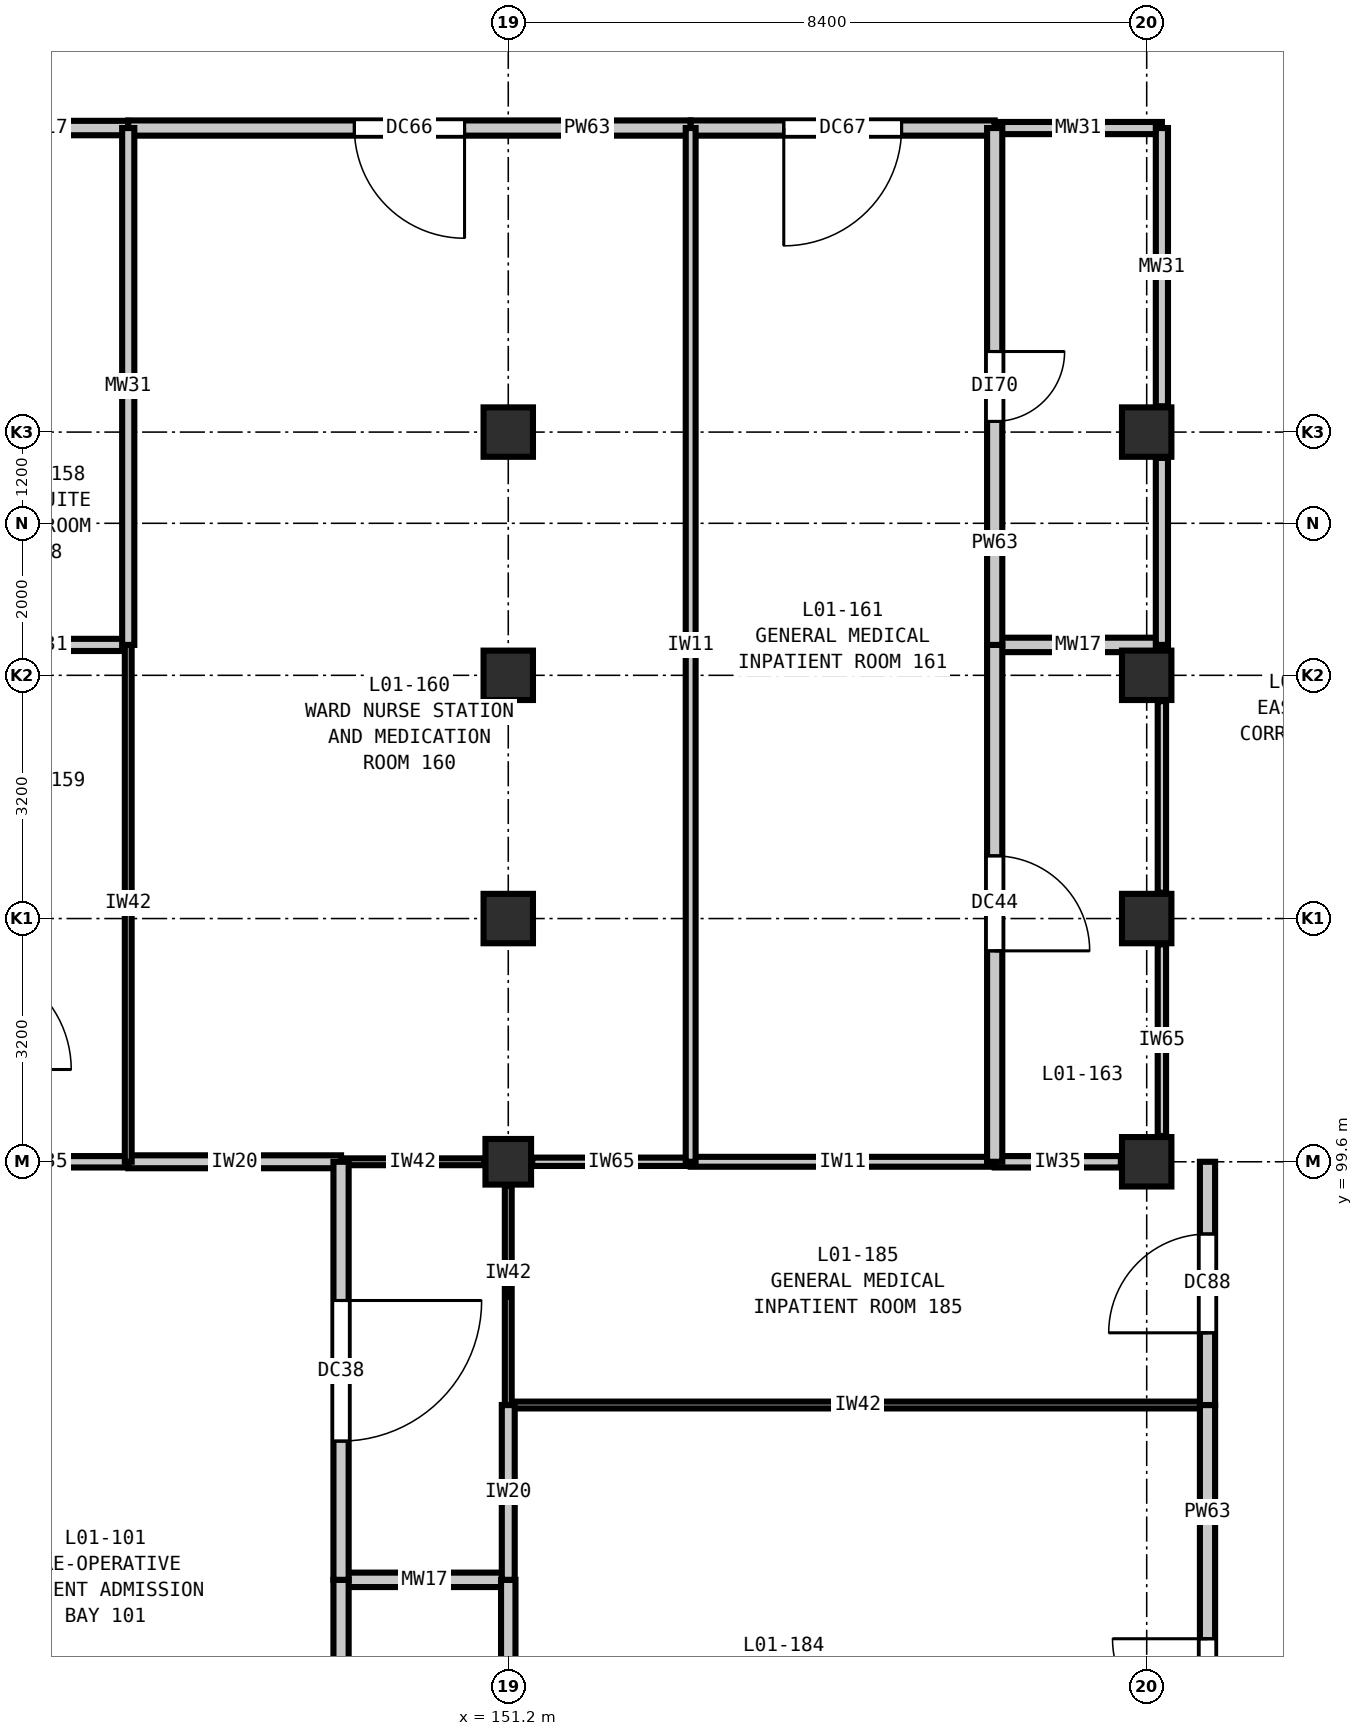
"""IFC4 building model, lengths in metres.
Left out: names, types, materials, properties, quantities, classifications, styles, units other than length and angle.
Written with IfcOpenShell. Run it as: python <this file> out.ifc"""

import sys

from ifc_helpers import new_model, si_unit, direction, frame, frame_2d, origin, origin_2d, place, context, subcontext, project, spatial, rectangle, extrude, element, fill, save


model = new_model("IFC4")
c1 = context("Model", 3, precision=1e-05, world=origin(), true_north=direction((0.0, 1.0)))
c2 = subcontext(c1, "Body", "Model", "MODEL_VIEW")
j1 = project(units=[si_unit("LENGTHUNIT", "METRE"), si_unit("PLANEANGLEUNIT", "RADIAN")], contexts=[c1])
p1 = place(None, origin())
s1 = spatial("IfcSite", under=j1, at=p1, CompositionType="ELEMENT")
p2 = place(p1, origin())
s2 = spatial("IfcBuilding", under=s1, at=p2, CompositionType="ELEMENT")
p3 = place(p2, frame((0.0, 0.0, 5.4)))
s3 = spatial("IfcBuildingStorey", under=s2, at=p3, CompositionType="ELEMENT", Elevation=5.4)
p4 = place(p3, frame((151.2, 99.6, 0.0), z_axis=(0.0, 0.0, 1.0), x_axis=(1.0, 0.0, 0.0)))
e1 = element("IfcColumn", 1, at=p4, inside=s3, PredefinedType="COLUMN", context=c2, shape_type="SweptSolid", body=[
    extrude(rectangle(XDim=0.6, YDim=0.6, at=origin_2d()), origin(), (0.0, 0.0, 1.0), 5.4),
])
for number, where, z_axis, x_axis in (
    (2, (151.2, 102.8, 0.0), (0.0, 0.0, 1.0), (1.0, 0.0, 0.0)),
    (3, (151.2, 106.0, 0.0), (0.0, 0.0, 1.0), (1.0, 0.0, 0.0)),
    (4, (151.2, 109.2, 0.0), (0.0, 0.0, 1.0), (1.0, 0.0, 0.0)),
    (5, (159.6, 99.6, 0.0), (0.0, 0.0, 1.0), (1.0, 0.0, 0.0)),
    (6, (159.6, 102.8, 0.0), (0.0, 0.0, 1.0), (1.0, 0.0, 0.0)),
    (7, (159.6, 106.0, 0.0), (0.0, 0.0, 1.0), (1.0, 0.0, 0.0)),
    (8, (159.6, 109.2, 0.0), (0.0, 0.0, 1.0), (1.0, 0.0, 0.0)),
):
    element("IfcColumn", number, at=place(p3, frame(where, z_axis=z_axis, x_axis=x_axis)), inside=s3, PredefinedType="COLUMN", context=c2, shape_type="SweptSolid", body=[
        extrude(rectangle(XDim=0.65, YDim=0.65, at=origin_2d()), origin(), (0.0, 0.0, 1.0), 5.4),
    ])
p5 = place(p3, frame((149.0, 94.1, 0.0), z_axis=(0.0, 0.0, 1.0), x_axis=(1.0, 0.0, 0.0)))
e9 = element("IfcWall", 9, at=p5, inside=s3, PredefinedType="PLUMBINGWALL", context=c2, shape_type="SweptSolid", body=[
    extrude(rectangle(XDim=2.2, YDim=0.19, at=frame_2d((1.1, 0.0))), origin(), (0.0, 0.0, 1.0), 5.05),
])
p6 = place(p3, frame((151.2, 96.4, 0.0), z_axis=(0.0, 0.0, 1.0), x_axis=(1.0, 0.0, 0.0)))
e10 = element("IfcWall", 10, at=p6, inside=s3, PredefinedType="PARTITIONING", context=c2, shape_type="SweptSolid", body=[
    extrude(rectangle(XDim=9.2, YDim=0.09, at=frame_2d((4.6, 0.0))), origin(), (0.0, 0.0, 1.0), 5.05),
])
p7 = place(p3, frame((144.0, 99.6, 0.0), z_axis=(0.0, 0.0, 1.0), x_axis=(1.0, 0.0, 0.0)))
e11 = element("IfcWall", 11, at=p7, inside=s3, PredefinedType="PARTITIONING", context=c2, shape_type="SweptSolid", body=[
    extrude(rectangle(XDim=2.2, YDim=0.15, at=frame_2d((1.1, 0.0))), origin(), (0.0, 0.0, 1.0), 4.685),
])
p8 = place(p3, frame((146.2, 99.6, 0.0), z_axis=(0.0, 0.0, 1.0), x_axis=(1.0, 0.0, 0.0)))
e12 = element("IfcWall", 12, at=p8, inside=s3, PredefinedType="PARTITIONING", context=c2, shape_type="SweptSolid", body=[
    extrude(rectangle(XDim=2.8, YDim=0.17, at=frame_2d((1.4, 0.0))), origin(), (0.0, 0.0, 1.0), 4.685),
])
p9 = place(p3, frame((149.0, 99.6, 0.0), z_axis=(0.0, 0.0, 1.0), x_axis=(1.0, 0.0, 0.0)))
e13 = element("IfcWall", 13, at=p9, inside=s3, PredefinedType="PARTITIONING", context=c2, shape_type="SweptSolid", body=[
    extrude(rectangle(XDim=1.885, YDim=0.09, at=frame_2d((0.942, 0.0))), origin(), (0.0, 0.0, 1.0), 4.685),
])
p10 = place(p3, frame((151.515, 99.6, 0.0), z_axis=(0.0, 0.0, 1.0), x_axis=(1.0, 0.0, 0.0)))
e14 = element("IfcWall", 14, at=p10, inside=s3, PredefinedType="PARTITIONING", context=c2, shape_type="SweptSolid", body=[
    extrude(rectangle(XDim=2.085, YDim=0.11, at=frame_2d((1.042, 0.0))), origin(), (0.0, 0.0, 1.0), 4.685),
])
p11 = place(p3, frame((153.6, 99.6, 0.0), z_axis=(0.0, 0.0, 1.0), x_axis=(1.0, 0.0, 0.0)))
e15 = element("IfcWall", 15, at=p11, inside=s3, PredefinedType="PARTITIONING", context=c2, shape_type="SweptSolid", body=[
    extrude(rectangle(XDim=4.0, YDim=0.13, at=frame_2d((2.0, 0.0))), origin(), (0.0, 0.0, 1.0), 4.685),
])
p12 = place(p3, frame((157.6, 99.6, 0.0), z_axis=(0.0, 0.0, 1.0), x_axis=(1.0, 0.0, 0.0)))
e16 = element("IfcWall", 16, at=p12, inside=s3, PredefinedType="PARTITIONING", context=c2, shape_type="SweptSolid", body=[
    extrude(rectangle(XDim=1.66, YDim=0.15, at=frame_2d((0.83, 0.0))), origin(), (0.0, 0.0, 1.0), 4.685),
])
p13 = place(p3, frame((144.0, 106.4, 0.0), z_axis=(0.0, 0.0, 1.0), x_axis=(1.0, 0.0, 0.0)))
e17 = element("IfcWall", 17, at=p13, inside=s3, PredefinedType="PLUMBINGWALL", context=c2, shape_type="SweptSolid", body=[
    extrude(rectangle(XDim=2.2, YDim=0.16, at=frame_2d((1.1, 0.0))), origin(), (0.0, 0.0, 1.0), 5.05),
])
for number, where, z_axis, x_axis in (
    (18, (157.6, 106.4, 0.0), (0.0, 0.0, 1.0), (1.0, 0.0, 0.0)),
    (19, (144.0, 113.2, 0.0), (0.0, 0.0, 1.0), (1.0, 0.0, 0.0)),
):
    element("IfcWall", number, at=place(p3, frame(where, z_axis=z_axis, x_axis=x_axis)), inside=s3, PredefinedType="PLUMBINGWALL", context=c2, shape_type="SweptSolid", body=[
        extrude(rectangle(XDim=2.2, YDim=0.19, at=frame_2d((1.1, 0.0))), origin(), (0.0, 0.0, 1.0), 5.05),
    ])
p14 = place(p3, frame((146.2, 113.2, 0.0), z_axis=(0.0, 0.0, 1.0), x_axis=(1.0, 0.0, 0.0)))
e20 = element("IfcWall", 20, at=p14, inside=s3, PredefinedType="PARTITIONING", context=c2, shape_type="SweptSolid", body=[
    extrude(rectangle(XDim=7.4, YDim=0.2, at=frame_2d((3.7, 0.0))), origin(), (0.0, 0.0, 1.0), 5.05),
])
p15 = place(p14, frame((2.975, 0.0, 0.0)))
e21 = element("IfcOpeningElement", 21, at=p15, cuts=e20, PredefinedType="OPENING", context=c2, shape_type="SweptSolid", body=[
    extrude(rectangle(XDim=1.45, YDim=2.25, at=frame_2d((0.725, 1.125))), frame((0.0, 0.11, 0.0), z_axis=(0.0, -1.0, 0.0), x_axis=(1.0, 0.0, 0.0)), (0.0, 0.0, 1.0), 0.22),
])
p16 = place(p3, frame((153.6, 113.2, 0.0), z_axis=(0.0, 0.0, 1.0), x_axis=(1.0, 0.0, 0.0)))
e22 = element("IfcWall", 22, at=p16, inside=s3, PredefinedType="PARTITIONING", context=c2, shape_type="SweptSolid", body=[
    extrude(rectangle(XDim=4.0, YDim=0.2, at=frame_2d((2.0, 0.0))), origin(), (0.0, 0.0, 1.0), 5.05),
])
p17 = place(p16, frame((1.225, 0.0, 0.0)))
e23 = element("IfcOpeningElement", 23, at=p17, cuts=e22, PredefinedType="OPENING", context=c2, shape_type="SweptSolid", body=[
    extrude(rectangle(XDim=1.55, YDim=2.25, at=frame_2d((0.775, 1.125))), frame((0.0, 0.11, 0.0), z_axis=(0.0, -1.0, 0.0), x_axis=(1.0, 0.0, 0.0)), (0.0, 0.0, 1.0), 0.22),
])
p18 = place(p3, frame((157.6, 113.2, 0.0), z_axis=(0.0, 0.0, 1.0), x_axis=(1.0, 0.0, 0.0)))
e24 = element("IfcWall", 24, at=p18, inside=s3, PredefinedType="PLUMBINGWALL", context=c2, shape_type="SweptSolid", body=[
    extrude(rectangle(XDim=2.2, YDim=0.16, at=frame_2d((1.1, 0.0))), origin(), (0.0, 0.0, 1.0), 5.05),
])
p19 = place(p3, frame((146.2, 99.6, 0.0), z_axis=(0.0, 0.0, 1.0), x_axis=(0.0, 1.0, 0.0)))
e25 = element("IfcWall", 25, at=p19, inside=s3, PredefinedType="PARTITIONING", context=c2, shape_type="SweptSolid", body=[
    extrude(rectangle(XDim=6.8, YDim=0.09, at=frame_2d((3.4, 0.0))), origin(), (0.0, 0.0, 1.0), 5.05),
])
p20 = place(p3, frame((146.2, 106.4, 0.0), z_axis=(0.0, 0.0, 1.0), x_axis=(0.0, 1.0, 0.0)))
e26 = element("IfcWall", 26, at=p20, inside=s3, PredefinedType="PLUMBINGWALL", context=c2, shape_type="SweptSolid", body=[
    extrude(rectangle(XDim=6.8, YDim=0.16, at=frame_2d((3.4, 0.0))), origin(), (0.0, 0.0, 1.0), 5.05),
])
p21 = place(p3, frame((149.0, 88.6, 0.0), z_axis=(0.0, 0.0, 1.0), x_axis=(0.0, 1.0, 0.0)))
e27 = element("IfcWall", 27, at=p21, inside=s3, PredefinedType="PARTITIONING", context=c2, shape_type="SweptSolid", body=[
    extrude(rectangle(XDim=5.5, YDim=0.2, at=frame_2d((2.75, 0.0))), origin(), (0.0, 0.0, 1.0), 5.05),
])
p22 = place(p21, frame((2.29, 0.0, 0.0)))
e28 = element("IfcOpeningElement", 28, at=p22, cuts=e27, PredefinedType="OPENING", context=c2, shape_type="SweptSolid", body=[
    extrude(rectangle(XDim=0.92, YDim=2.1, at=frame_2d((0.46, 1.05))), frame((0.0, 0.11, 0.0), z_axis=(0.0, -1.0, 0.0), x_axis=(1.0, 0.0, 0.0)), (0.0, 0.0, 1.0), 0.22),
])
p23 = place(p3, frame((149.0, 94.1, 0.0), z_axis=(0.0, 0.0, 1.0), x_axis=(0.0, 1.0, 0.0)))
e29 = element("IfcWall", 29, at=p23, inside=s3, PredefinedType="PARTITIONING", context=c2, shape_type="SweptSolid", body=[
    extrude(rectangle(XDim=5.5, YDim=0.2, at=frame_2d((2.75, 0.0))), origin(), (0.0, 0.0, 1.0), 5.05),
])
p24 = place(p23, frame((1.825, 0.0, 0.0)))
e30 = element("IfcOpeningElement", 30, at=p24, cuts=e29, PredefinedType="OPENING", context=c2, shape_type="SweptSolid", body=[
    extrude(rectangle(XDim=1.85, YDim=2.3, at=frame_2d((0.925, 1.15))), frame((0.0, 0.11, 0.0), z_axis=(0.0, -1.0, 0.0), x_axis=(1.0, 0.0, 0.0)), (0.0, 0.0, 1.0), 0.22),
])
p25 = place(p3, frame((151.2, 91.515, 0.0), z_axis=(0.0, 0.0, 1.0), x_axis=(0.0, 1.0, 0.0)))
e31 = element("IfcWall", 31, at=p25, inside=s3, PredefinedType="PLUMBINGWALL", context=c2, shape_type="SweptSolid", body=[
    extrude(rectangle(XDim=2.585, YDim=0.19, at=frame_2d((1.292, 0.0))), origin(), (0.0, 0.0, 1.0), 4.735),
])
p26 = place(p3, frame((151.2, 94.1, 0.0), z_axis=(0.0, 0.0, 1.0), x_axis=(0.0, 1.0, 0.0)))
e32 = element("IfcWall", 32, at=p26, inside=s3, PredefinedType="PARTITIONING", context=c2, shape_type="SweptSolid", body=[
    extrude(rectangle(XDim=2.3, YDim=0.17, at=frame_2d((1.15, 0.0))), origin(), (0.0, 0.0, 1.0), 4.735),
])
p27 = place(p3, frame((151.2, 96.4, 0.0), z_axis=(0.0, 0.0, 1.0), x_axis=(0.0, 1.0, 0.0)))
e33 = element("IfcWall", 33, at=p27, inside=s3, PredefinedType="PARTITIONING", context=c2, shape_type="SweptSolid", body=[
    extrude(rectangle(XDim=2.885, YDim=0.09, at=frame_2d((1.442, 0.0))), origin(), (0.0, 0.0, 1.0), 4.735),
])
p28 = place(p3, frame((153.6, 99.6, 0.0), z_axis=(0.0, 0.0, 1.0), x_axis=(0.0, 1.0, 0.0)))
e34 = element("IfcWall", 34, at=p28, inside=s3, PredefinedType="PARTITIONING", context=c2, shape_type="SweptSolid", body=[
    extrude(rectangle(XDim=13.6, YDim=0.13, at=frame_2d((6.8, 0.0))), origin(), (0.0, 0.0, 1.0), 5.05),
])
p29 = place(p3, frame((157.6, 99.6, 0.0), z_axis=(0.0, 0.0, 1.0), x_axis=(0.0, 1.0, 0.0)))
e35 = element("IfcWall", 35, at=p29, inside=s3, PredefinedType="PARTITIONING", context=c2, shape_type="SweptSolid", body=[
    extrude(rectangle(XDim=6.8, YDim=0.2, at=frame_2d((3.4, 0.0))), origin(), (0.0, 0.0, 1.0), 5.05),
])
p30 = place(p29, frame((2.775, 0.0, 0.0)))
e36 = element("IfcOpeningElement", 36, at=p30, cuts=e35, PredefinedType="OPENING", context=c2, shape_type="SweptSolid", body=[
    extrude(rectangle(XDim=1.25, YDim=2.15, at=frame_2d((0.625, 1.075))), frame((0.0, 0.11, 0.0), z_axis=(0.0, -1.0, 0.0), x_axis=(1.0, 0.0, 0.0)), (0.0, 0.0, 1.0), 0.22),
])
p31 = place(p3, frame((157.6, 106.4, 0.0), z_axis=(0.0, 0.0, 1.0), x_axis=(0.0, 1.0, 0.0)))
e37 = element("IfcWall", 37, at=p31, inside=s3, PredefinedType="PARTITIONING", context=c2, shape_type="SweptSolid", body=[
    extrude(rectangle(XDim=6.8, YDim=0.2, at=frame_2d((3.4, 0.0))), origin(), (0.0, 0.0, 1.0), 5.05),
])
p32 = place(p31, frame((2.94, 0.0, 0.0)))
e38 = element("IfcOpeningElement", 38, at=p32, cuts=e37, PredefinedType="OPENING", context=c2, shape_type="SweptSolid", body=[
    extrude(rectangle(XDim=0.92, YDim=2.1, at=frame_2d((0.46, 1.05))), frame((0.0, 0.11, 0.0), z_axis=(0.0, -1.0, 0.0), x_axis=(1.0, 0.0, 0.0)), (0.0, 0.0, 1.0), 0.22),
])
for number, where, z_axis, x_axis in (
    (39, (159.8, 99.94, 0.0), (0.0, 0.0, 1.0), (0.0, 1.0, 0.0)),
    (40, (159.8, 103.14, 0.0), (0.0, 0.0, 1.0), (0.0, 1.0, 0.0)),
):
    element("IfcWall", number, at=place(p3, frame(where, z_axis=z_axis, x_axis=x_axis)), inside=s3, PredefinedType="PARTITIONING", context=c2, shape_type="SweptSolid", body=[
        extrude(rectangle(XDim=2.52, YDim=0.11, at=frame_2d((1.26, 0.0))), origin(), (0.0, 0.0, 1.0), 4.735),
    ])
p33 = place(p3, frame((159.8, 109.54, 0.0), z_axis=(0.0, 0.0, 1.0), x_axis=(0.0, 1.0, 0.0)))
e41 = element("IfcWall", 41, at=p33, inside=s3, PredefinedType="PLUMBINGWALL", context=c2, shape_type="SweptSolid", body=[
    extrude(rectangle(XDim=3.66, YDim=0.16, at=frame_2d((1.83, 0.0))), origin(), (0.0, 0.0, 1.0), 4.735),
])
p34 = place(p3, frame((159.8, 106.4, 0.0), z_axis=(0.0, 0.0, 1.0), x_axis=(0.0, 1.0, 0.0)))
e42 = element("IfcWall", 42, at=p34, inside=s3, PredefinedType="PLUMBINGWALL", context=c2, shape_type="SweptSolid", body=[
    extrude(rectangle(XDim=2.46, YDim=0.16, at=frame_2d((1.23, 0.0))), origin(), (0.0, 0.0, 1.0), 4.735),
])
p35 = place(p3, frame((160.4, 89.0, 0.0), z_axis=(0.0, 0.0, 1.0), x_axis=(0.0, 1.0, 0.0)))
e43 = element("IfcWall", 43, at=p35, inside=s3, PredefinedType="PARTITIONING", context=c2, shape_type="SweptSolid", body=[
    extrude(rectangle(XDim=7.4, YDim=0.2, at=frame_2d((3.7, 0.0))), origin(), (0.0, 0.0, 1.0), 5.05),
])
p36 = place(p35, frame((3.075, 0.0, 0.0)))
e44 = element("IfcOpeningElement", 44, at=p36, cuts=e43, PredefinedType="OPENING", context=c2, shape_type="SweptSolid", body=[
    extrude(rectangle(XDim=1.25, YDim=2.15, at=frame_2d((0.625, 1.075))), frame((0.0, 0.11, 0.0), z_axis=(0.0, -1.0, 0.0), x_axis=(1.0, 0.0, 0.0)), (0.0, 0.0, 1.0), 0.22),
])
p37 = place(p3, frame((160.4, 96.4, 0.0), z_axis=(0.0, 0.0, 1.0), x_axis=(0.0, 1.0, 0.0)))
e45 = element("IfcWall", 45, at=p37, inside=s3, PredefinedType="PARTITIONING", context=c2, shape_type="SweptSolid", body=[
    extrude(rectangle(XDim=3.2, YDim=0.2, at=frame_2d((1.6, 0.0))), origin(), (0.0, 0.0, 1.0), 5.05),
])
p38 = place(p37, frame((0.95, 0.0, 0.0)))
e46 = element("IfcOpeningElement", 46, at=p38, cuts=e45, PredefinedType="OPENING", context=c2, shape_type="SweptSolid", body=[
    extrude(rectangle(XDim=1.3, YDim=2.2, at=frame_2d((0.65, 1.1))), frame((0.0, 0.11, 0.0), z_axis=(0.0, -1.0, 0.0), x_axis=(1.0, 0.0, 0.0)), (0.0, 0.0, 1.0), 0.22),
])
p39 = place(p15, frame((1.45, 0.0, 0.0), z_axis=(0.0, 0.0, 1.0), x_axis=(-1.0, 0.0, 0.0)))
e47 = element("IfcDoor", 47, at=p39, inside=s3, OperationType="SINGLE_SWING_LEFT", PredefinedType="DOOR", context=c2, shape_type="SweptSolid", body=[
    extrude(rectangle(XDim=1.45, YDim=2.25, at=frame_2d((0.725, 1.125))), frame((0.0, 0.025, 0.0), z_axis=(0.0, -1.0, 0.0), x_axis=(1.0, 0.0, 0.0)), (0.0, 0.0, 1.0), 0.05),
])
fill(e21, e47)
p40 = place(p17, frame((1.55, 0.0, 0.0), z_axis=(0.0, 0.0, 1.0), x_axis=(-1.0, 0.0, 0.0)))
e48 = element("IfcDoor", 48, at=p40, inside=s3, OperationType="SINGLE_SWING_RIGHT", PredefinedType="DOOR", context=c2, shape_type="SweptSolid", body=[
    extrude(rectangle(XDim=1.55, YDim=2.25, at=frame_2d((0.775, 1.125))), frame((0.0, 0.025, 0.0), z_axis=(0.0, -1.0, 0.0), x_axis=(1.0, 0.0, 0.0)), (0.0, 0.0, 1.0), 0.05),
])
fill(e23, e48)
p41 = place(p24, frame((1.85, 0.0, 0.0), z_axis=(0.0, 0.0, 1.0), x_axis=(-1.0, 0.0, 0.0)))
e49 = element("IfcDoor", 49, at=p41, inside=s3, OperationType="SINGLE_SWING_LEFT", PredefinedType="DOOR", context=c2, shape_type="SweptSolid", body=[
    extrude(rectangle(XDim=1.85, YDim=2.3, at=frame_2d((0.925, 1.15))), frame((0.0, 0.025, 0.0), z_axis=(0.0, -1.0, 0.0), x_axis=(1.0, 0.0, 0.0)), (0.0, 0.0, 1.0), 0.05),
])
fill(e30, e49)
p42 = place(p30, frame((1.25, 0.0, 0.0), z_axis=(0.0, 0.0, 1.0), x_axis=(-1.0, 0.0, 0.0)))
e50 = element("IfcDoor", 50, at=p42, inside=s3, OperationType="SINGLE_SWING_RIGHT", PredefinedType="DOOR", context=c2, shape_type="SweptSolid", body=[
    extrude(rectangle(XDim=1.25, YDim=2.15, at=frame_2d((0.625, 1.075))), frame((0.0, 0.025, 0.0), z_axis=(0.0, -1.0, 0.0), x_axis=(1.0, 0.0, 0.0)), (0.0, 0.0, 1.0), 0.05),
])
fill(e36, e50)
p43 = place(p32, frame((0.92, 0.0, 0.0), z_axis=(0.0, 0.0, 1.0), x_axis=(-1.0, 0.0, 0.0)))
e51 = element("IfcDoor", 51, at=p43, inside=s3, OperationType="SINGLE_SWING_LEFT", PredefinedType="DOOR", context=c2, shape_type="SweptSolid", body=[
    extrude(rectangle(XDim=0.92, YDim=2.1, at=frame_2d((0.46, 1.05))), frame((0.0, 0.025, 0.0), z_axis=(0.0, -1.0, 0.0), x_axis=(1.0, 0.0, 0.0)), (0.0, 0.0, 1.0), 0.05),
])
fill(e38, e51)
p44 = place(p36, origin())
e52 = element("IfcDoor", 52, at=p44, inside=s3, OperationType="SINGLE_SWING_RIGHT", PredefinedType="DOOR", context=c2, shape_type="SweptSolid", body=[
    extrude(rectangle(XDim=1.25, YDim=2.15, at=frame_2d((0.625, 1.075))), frame((0.0, 0.025, 0.0), z_axis=(0.0, -1.0, 0.0), x_axis=(1.0, 0.0, 0.0)), (0.0, 0.0, 1.0), 0.05),
])
fill(e44, e52)
p45 = place(p38, origin())
e53 = element("IfcDoor", 53, at=p45, inside=s3, OperationType="SINGLE_SWING_LEFT", PredefinedType="DOOR", context=c2, shape_type="SweptSolid", body=[
    extrude(rectangle(XDim=1.3, YDim=2.2, at=frame_2d((0.65, 1.1))), frame((0.0, 0.025, 0.0), z_axis=(0.0, -1.0, 0.0), x_axis=(1.0, 0.0, 0.0)), (0.0, 0.0, 1.0), 0.05),
])
fill(e46, e53)
save(model, sys.argv[1])
